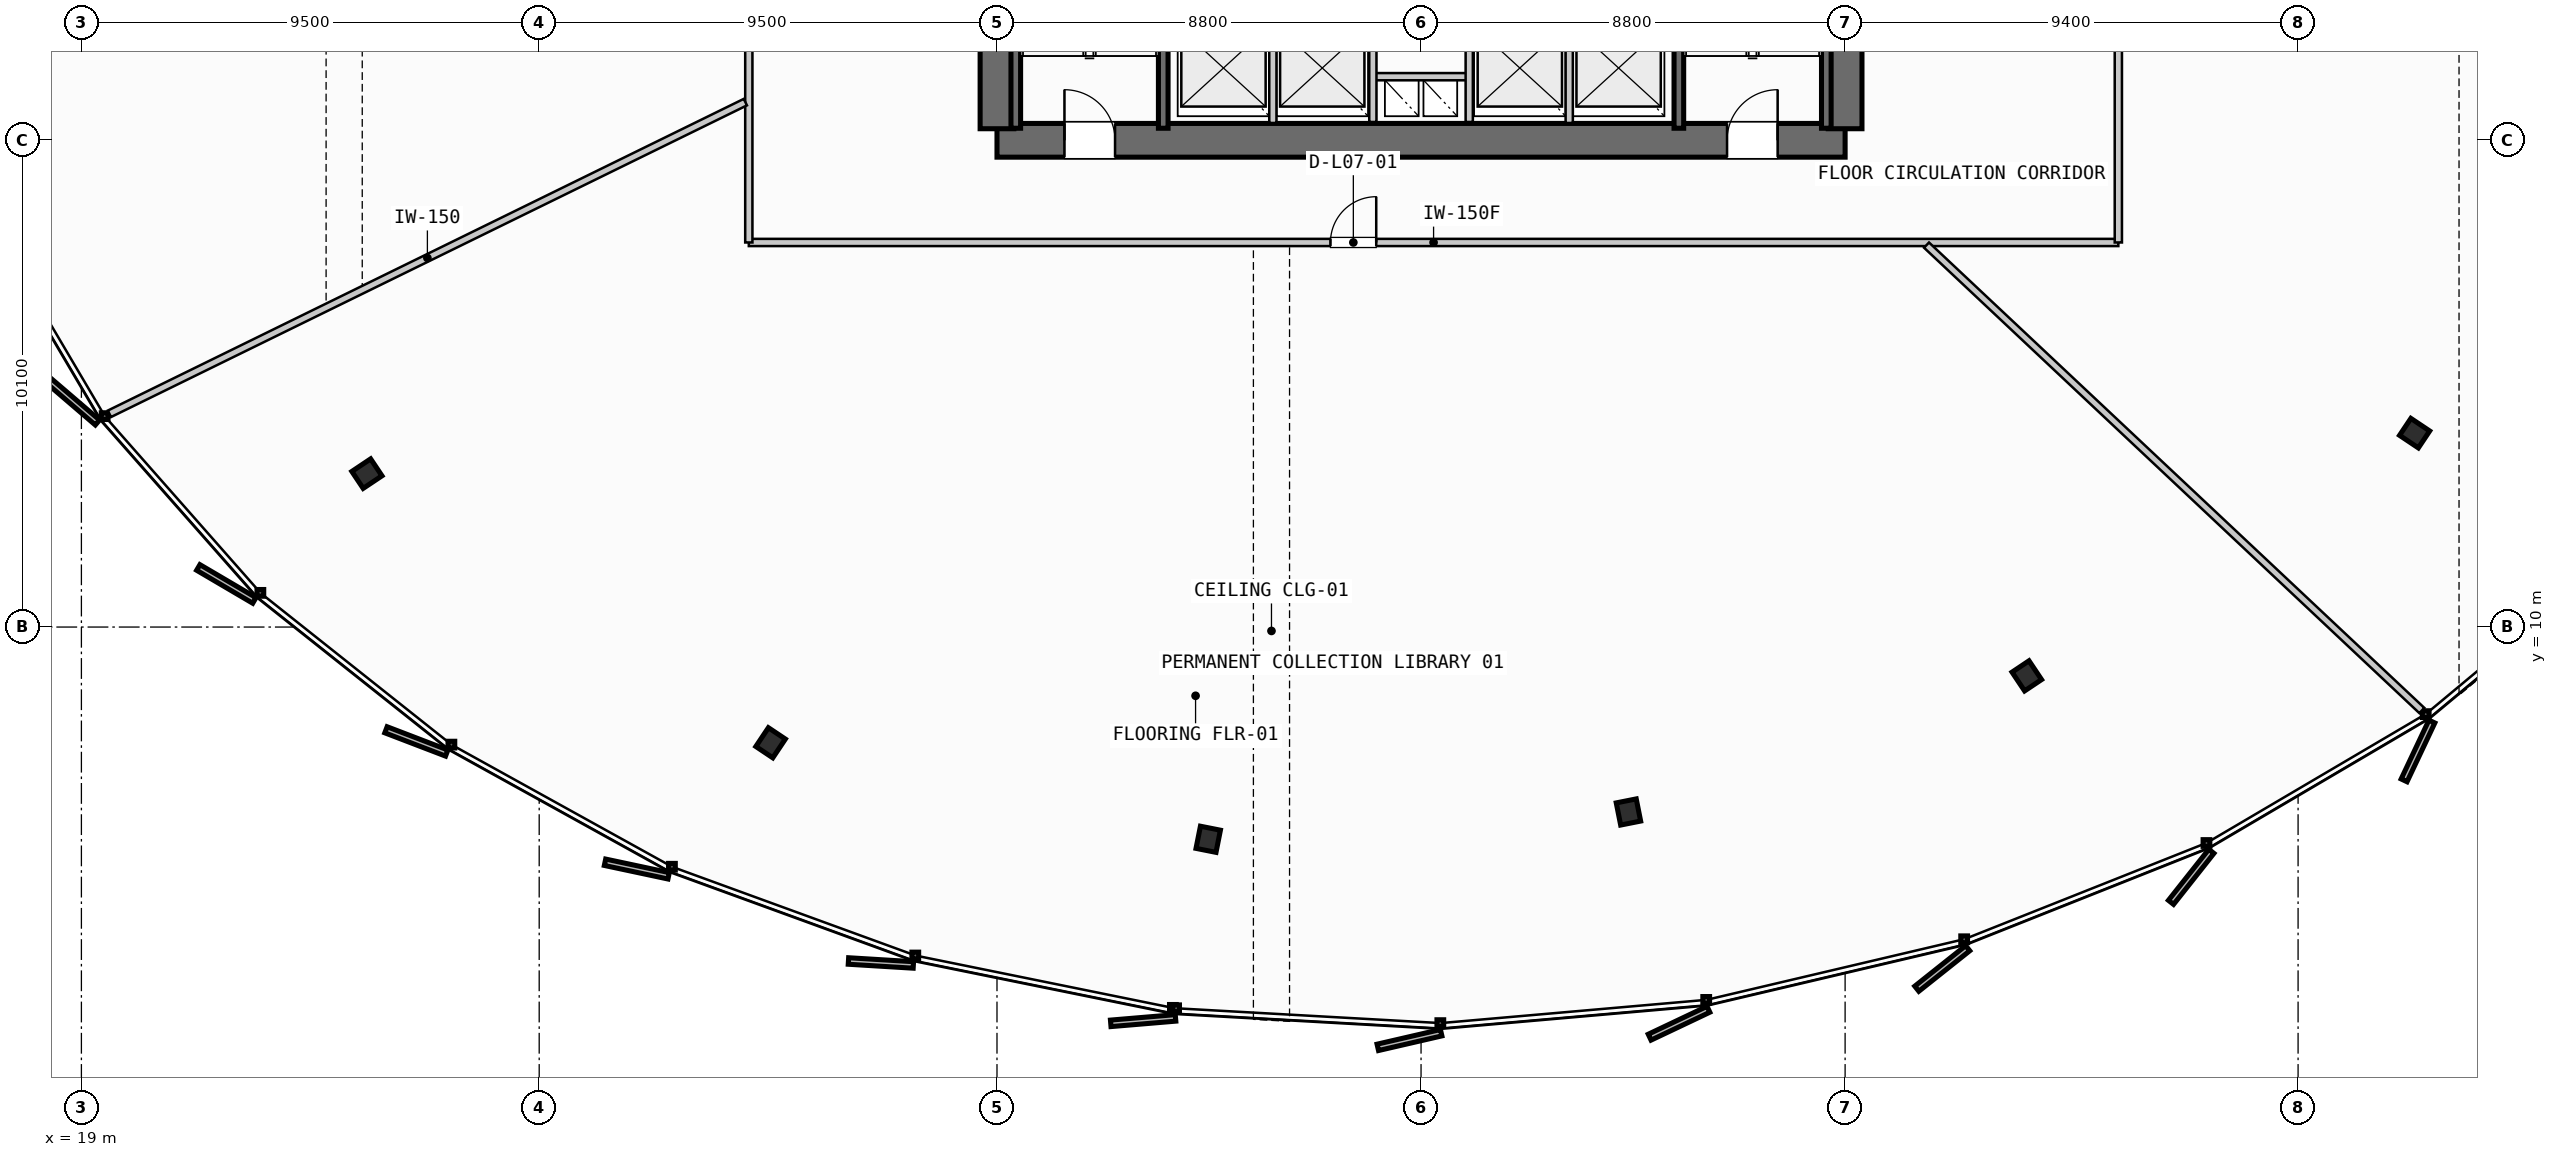
"""IFC4 building model, lengths in metres.
Left out: names, types, materials, properties, quantities, classifications, styles, units other than length and angle.
Written with IfcOpenShell. Run it as: python <this file> out.ifc"""

import sys

from ifc_helpers import new_model, si_unit, direction, frame, frame_2d, origin, origin_2d, place, context, subcontext, project, spatial, rectangle, i_section, extrude, source, transform, mapped, element, fill, save


model = new_model("IFC4")
c1 = context("Model", 3, precision=1e-05, world=origin(), true_north=direction((0.0, 1.0)))
c2 = subcontext(c1, "Body", "Model", "MODEL_VIEW")
j1 = project(units=[si_unit("LENGTHUNIT", "METRE"), si_unit("PLANEANGLEUNIT", "RADIAN")], contexts=[c1])
p1 = place(None, origin())
s1 = spatial("IfcSite", under=j1, at=p1, CompositionType="ELEMENT")
p2 = place(p1, origin())
s2 = spatial("IfcBuilding", under=s1, at=p2, CompositionType="ELEMENT")
p3 = place(p2, frame((0.0, 0.0, 33.4)))
s3 = spatial("IfcBuildingStorey", under=s2, at=p3, CompositionType="ELEMENT", Elevation=33.4)
p4 = place(p3, frame((38.0, 20.1, 0.0), z_axis=(0.0, 0.0, 1.0), x_axis=(1.0, 0.0, 0.0)))
e1 = element("IfcWall", 1, at=p4, inside=s3, PredefinedType="SHEAR", context=c2, shape_type="SweptSolid", body=[
    extrude(rectangle(XDim=17.6, YDim=0.7, at=frame_2d((8.8, 0.0))), origin(), (0.0, 0.0, 1.0), 3.55),
])
p5 = place(p4, frame((1.4, 0.0, 0.0)))
e2 = element("IfcOpeningElement", 2, at=p5, cuts=e1, PredefinedType="OPENING", context=c2, shape_type="SweptSolid", body=[
    extrude(rectangle(XDim=1.05, YDim=2.15, at=frame_2d((0.525, 1.075))), frame((0.0, 0.36, 0.0), z_axis=(0.0, -1.0, 0.0), x_axis=(1.0, 0.0, 0.0)), (0.0, 0.0, 1.0), 0.72),
])
p6 = place(p4, frame((15.15, 0.0, 0.0)))
e3 = element("IfcOpeningElement", 3, at=p6, cuts=e1, PredefinedType="OPENING", context=c2, shape_type="SweptSolid", body=[
    extrude(rectangle(XDim=1.05, YDim=2.15, at=frame_2d((0.525, 1.075))), frame((0.0, 0.36, 0.0), z_axis=(0.0, -1.0, 0.0), x_axis=(1.0, 0.0, 0.0)), (0.0, 0.0, 1.0), 0.72),
])
p7 = place(p3, frame((38.0, 35.26, 0.0), z_axis=(0.0, 0.0, 1.0), x_axis=(0.0, -1.0, 0.0)))
e4 = element("IfcWall", 4, at=p7, inside=s3, PredefinedType="SHEAR", context=c2, shape_type="SweptSolid", body=[
    extrude(rectangle(XDim=14.92, YDim=0.7, at=frame_2d((7.46, 0.0))), origin(), (0.0, 0.0, 1.0), 3.55),
])
p8 = place(p7, frame((5.21, 0.0, 0.0)))
e5 = element("IfcOpeningElement", 5, at=p8, cuts=e4, PredefinedType="OPENING", context=c2, shape_type="SweptSolid", body=[
    extrude(rectangle(XDim=1.1, YDim=2.2, at=frame_2d((0.55, 1.1))), frame((0.0, 0.36, 0.0), z_axis=(0.0, -1.0, 0.0), x_axis=(1.0, 0.0, 0.0)), (0.0, 0.0, 1.0), 0.72),
])
p9 = place(p3, frame((55.6, 20.34, 0.0), z_axis=(0.0, 0.0, 1.0), x_axis=(0.0, 1.0, 0.0)))
e6 = element("IfcWall", 6, at=p9, inside=s3, PredefinedType="SHEAR", context=c2, shape_type="SweptSolid", body=[
    extrude(rectangle(XDim=14.92, YDim=0.7, at=frame_2d((7.46, 0.0))), origin(), (0.0, 0.0, 1.0), 3.55),
])
p10 = place(p9, frame((12.71, 0.0, 0.0)))
e7 = element("IfcOpeningElement", 7, at=p10, cuts=e6, PredefinedType="OPENING", context=c2, shape_type="SweptSolid", body=[
    extrude(rectangle(XDim=1.05, YDim=2.15, at=frame_2d((0.525, 1.075))), frame((0.0, 0.36, 0.0), z_axis=(0.0, -1.0, 0.0), x_axis=(1.0, 0.0, 0.0)), (0.0, 0.0, 1.0), 0.72),
])
p11 = place(p9, frame((8.61, 0.0, 0.0)))
e8 = element("IfcOpeningElement", 8, at=p11, cuts=e6, PredefinedType="OPENING", context=c2, shape_type="SweptSolid", body=[
    extrude(rectangle(XDim=1.1, YDim=2.2, at=frame_2d((0.55, 1.1))), frame((0.0, 0.36, 0.0), z_axis=(0.0, -1.0, 0.0), x_axis=(1.0, 0.0, 0.0)), (0.0, 0.0, 1.0), 0.72),
])
m1 = source(origin(), c2, "Body", "SweptSolid", [
    extrude(i_section(OverallWidth=0.423, OverallDepth=0.469, WebThickness=0.051, FlangeThickness=0.081, FilletRadius=0.015, at=origin_2d()), origin(), (0.0, 0.0, 1.0), 3.55),
])
for number, where, z_axis, x_axis in (
    (9, (24.925, 13.183, 0.0), (0.0, 0.0, 1.0), (-0.831, -0.556, 0.0)),
    (10, (33.302, 7.599, 0.0), (0.0, 0.0, 1.0), (-0.556, -0.831, 0.0)),
    (11, (42.383, 5.596, 0.0), (0.0, 0.0, 1.0), (-0.195, -0.981, 0.0)),
    (12, (51.104, 6.163, 0.0), (0.0, 0.0, 1.0), (0.195, -0.981, 0.0)),
    (13, (59.37, 8.987, 0.0), (0.0, 0.0, 1.0), (0.556, -0.831, 0.0)),
    (14, (67.418, 14.023, 0.0), (0.0, 0.0, 1.0), (0.831, -0.556, 0.0)),
):
    element("IfcColumn", number, at=place(p3, frame(where, z_axis=z_axis, x_axis=x_axis)), inside=s3, PredefinedType="COLUMN", context=c2, shape_type="MappedRepresentation", body=[
        mapped(m1, transform((0.0, 0.0, 0.0), scale=1.0)),
    ])
for number, where, z_axis, x_axis in (
    (15, (41.45, 27.7, 0.0), (0.0, 0.0, 1.0), (0.0, -1.0, 0.0)),
    (16, (38.39, 20.35, 0.0), (0.0, 0.0, 1.0), (0.0, 1.0, 0.0)),
    (17, (55.21, 27.7, 0.0), (0.0, 0.0, 1.0), (0.0, -1.0, 0.0)),
    (18, (52.15, 20.35, 0.0), (0.0, 0.0, 1.0), (0.0, 1.0, 0.0)),
):
    element("IfcWall", number, at=place(p3, frame(where, z_axis=z_axis, x_axis=x_axis)), inside=s3, PredefinedType="SHEAR", context=c2, shape_type="SweptSolid", body=[
        extrude(rectangle(XDim=7.35, YDim=0.2, at=frame_2d((3.675, 0.0))), origin(), (0.0, 0.0, 1.0), 3.55),
    ])
p12 = place(p3, frame((45.8, 21.42, 0.0), z_axis=(0.0, 0.0, 1.0), x_axis=(1.0, 0.0, 0.0)))
e19 = element("IfcWall", 19, at=p12, inside=s3, PredefinedType="PARTITIONING", context=c2, shape_type="SweptSolid", body=[
    extrude(rectangle(XDim=2.0, YDim=0.15, at=frame_2d((1.0, 0.0))), origin(), (0.0, 0.0, 1.0), 2.925),
])
for number, where, z_axis, x_axis in (
    (20, (45.8, 20.48, 0.0), (0.0, 0.0, 1.0), (0.0, 1.0, 0.0)),
    (21, (47.8, 20.48, 0.0), (0.0, 0.0, 1.0), (0.0, 1.0, 0.0)),
):
    element("IfcWall", number, at=place(p3, frame(where, z_axis=z_axis, x_axis=x_axis)), inside=s3, PredefinedType="PARTITIONING", context=c2, shape_type="SweptSolid", body=[
        extrude(rectangle(XDim=2.24, YDim=0.15, at=frame_2d((1.12, 0.0))), origin(), (0.0, 0.0, 1.0), 2.925),
    ])
for number, where, z_axis, x_axis in (
    (22, (43.725, 20.46, 0.0), (0.0, 0.0, 1.0), (0.0, 1.0, 0.0)),
    (23, (49.875, 20.46, 0.0), (0.0, 0.0, 1.0), (0.0, 1.0, 0.0)),
):
    element("IfcWall", number, at=place(p3, frame(where, z_axis=z_axis, x_axis=x_axis)), inside=s3, PredefinedType="PARTITIONING", context=c2, shape_type="SweptSolid", body=[
        extrude(rectangle(XDim=2.27, YDim=0.15, at=frame_2d((1.135, 0.0))), origin(), (0.0, 0.0, 1.0), 2.925),
    ])
p13 = place(p3, frame((32.85, 17.98, 0.0), z_axis=(0.0, 0.0, 1.0), x_axis=(1.0, 0.0, 0.0)))
e24 = element("IfcWall", 24, at=p13, inside=s3, PredefinedType="PARTITIONING", context=c2, shape_type="SweptSolid", body=[
    extrude(rectangle(XDim=28.42, YDim=0.15, at=frame_2d((14.21, 0.0))), origin(), (0.0, 0.0, 1.0), 2.925),
])
p14 = place(p13, frame((12.07, 0.0, 0.0)))
e25 = element("IfcOpeningElement", 25, at=p14, cuts=e24, PredefinedType="OPENING", context=c2, shape_type="SweptSolid", body=[
    extrude(rectangle(XDim=0.95, YDim=2.15, at=frame_2d((0.475, 1.075))), frame((0.0, 0.085, 0.0), z_axis=(0.0, -1.0, 0.0), x_axis=(1.0, 0.0, 0.0)), (0.0, 0.0, 1.0), 0.17),
])
p15 = place(p3, frame((61.27, 17.98, 0.0), z_axis=(0.0, 0.0, 1.0), x_axis=(0.0, 1.0, 0.0)))
e26 = element("IfcWall", 26, at=p15, inside=s3, PredefinedType="PARTITIONING", context=c2, shape_type="SweptSolid", body=[
    extrude(rectangle(XDim=20.06, YDim=0.15, at=frame_2d((10.03, 0.0))), origin(), (0.0, 0.0, 1.0), 2.925),
])
p16 = place(p15, frame((8.217, 0.0, 0.0)))
e27 = element("IfcOpeningElement", 27, at=p16, cuts=e26, PredefinedType="OPENING", context=c2, shape_type="SweptSolid", body=[
    extrude(rectangle(XDim=0.95, YDim=2.15, at=frame_2d((0.475, 1.075))), frame((0.0, 0.085, 0.0), z_axis=(0.0, -1.0, 0.0), x_axis=(1.0, 0.0, 0.0)), (0.0, 0.0, 1.0), 0.17),
])
p17 = place(p3, frame((32.85, 38.04, 0.0), z_axis=(0.0, 0.0, 1.0), x_axis=(0.0, -1.0, 0.0)))
e28 = element("IfcWall", 28, at=p17, inside=s3, PredefinedType="PARTITIONING", context=c2, shape_type="SweptSolid", body=[
    extrude(rectangle(XDim=20.06, YDim=0.15, at=frame_2d((10.03, 0.0))), origin(), (0.0, 0.0, 1.0), 2.925),
])
p18 = place(p17, frame((8.387, 0.0, 0.0)))
e29 = element("IfcOpeningElement", 29, at=p18, cuts=e28, PredefinedType="OPENING", context=c2, shape_type="SweptSolid", body=[
    extrude(rectangle(XDim=0.95, YDim=2.15, at=frame_2d((0.475, 1.075))), frame((0.0, 0.085, 0.0), z_axis=(0.0, -1.0, 0.0), x_axis=(1.0, 0.0, 0.0)), (0.0, 0.0, 1.0), 0.17),
])
p19 = place(p3, frame((32.778, 20.892, 0.0), z_axis=(0.0, 0.0, 1.0), x_axis=(-0.897976844956, -0.440042709204, 0.0)))
e30 = element("IfcWall", 30, at=p19, inside=s3, PredefinedType="PARTITIONING", context=c2, shape_type="SweptSolid", body=[
    extrude(rectangle(XDim=14.696, YDim=0.15, at=frame_2d((7.348, 0.0))), origin(), (0.0, 0.0, 1.0), 2.925),
])
p20 = place(p3, frame((57.29, 17.925, 0.0), z_axis=(0.0, 0.0, 1.0), x_axis=(0.728808020187, -0.684718095066, 0.0)))
e31 = element("IfcWall", 31, at=p20, inside=s3, PredefinedType="PARTITIONING", context=c2, shape_type="SweptSolid", body=[
    extrude(rectangle(XDim=14.104, YDim=0.15, at=frame_2d((7.052, 0.0))), origin(), (0.0, 0.0, 1.0), 2.925),
])
m2 = source(origin(), c2, "Body", "SweptSolid", [
    extrude(rectangle(XDim=1.05, YDim=2.15, at=frame_2d((0.525, 1.075))), frame((0.0, 0.025, 0.0), z_axis=(0.0, -1.0, 0.0), x_axis=(1.0, 0.0, 0.0)), (0.0, 0.0, 1.0), 0.05),
])
p21 = place(p5, origin())
e32 = element("IfcDoor", 32, at=p21, inside=s3, OperationType="SINGLE_SWING_LEFT", PredefinedType="DOOR", context=c2, shape_type="MappedRepresentation", body=[
    mapped(m2, transform((0.0, 0.0, 0.0), scale=1.0)),
])
fill(e2, e32)
p22 = place(p6, origin())
e33 = element("IfcDoor", 33, at=p22, inside=s3, OperationType="SINGLE_SWING_RIGHT", PredefinedType="DOOR", context=c2, shape_type="MappedRepresentation", body=[
    mapped(m2, transform((0.0, 0.0, 0.0), scale=1.0)),
])
fill(e3, e33)
m3 = source(origin(), c2, "Body", "SweptSolid", [
    extrude(rectangle(XDim=0.95, YDim=2.15, at=frame_2d((0.475, 1.075))), frame((0.0, 0.025, 0.0), z_axis=(0.0, -1.0, 0.0), x_axis=(1.0, 0.0, 0.0)), (0.0, 0.0, 1.0), 0.05),
])
p23 = place(p14, origin())
e34 = element("IfcDoor", 34, at=p23, inside=s3, OperationType="SINGLE_SWING_RIGHT", PredefinedType="DOOR", context=c2, shape_type="MappedRepresentation", body=[
    mapped(m3, transform((0.0, 0.0, 0.0), scale=1.0)),
])
fill(e25, e34)
save(model, sys.argv[1])
